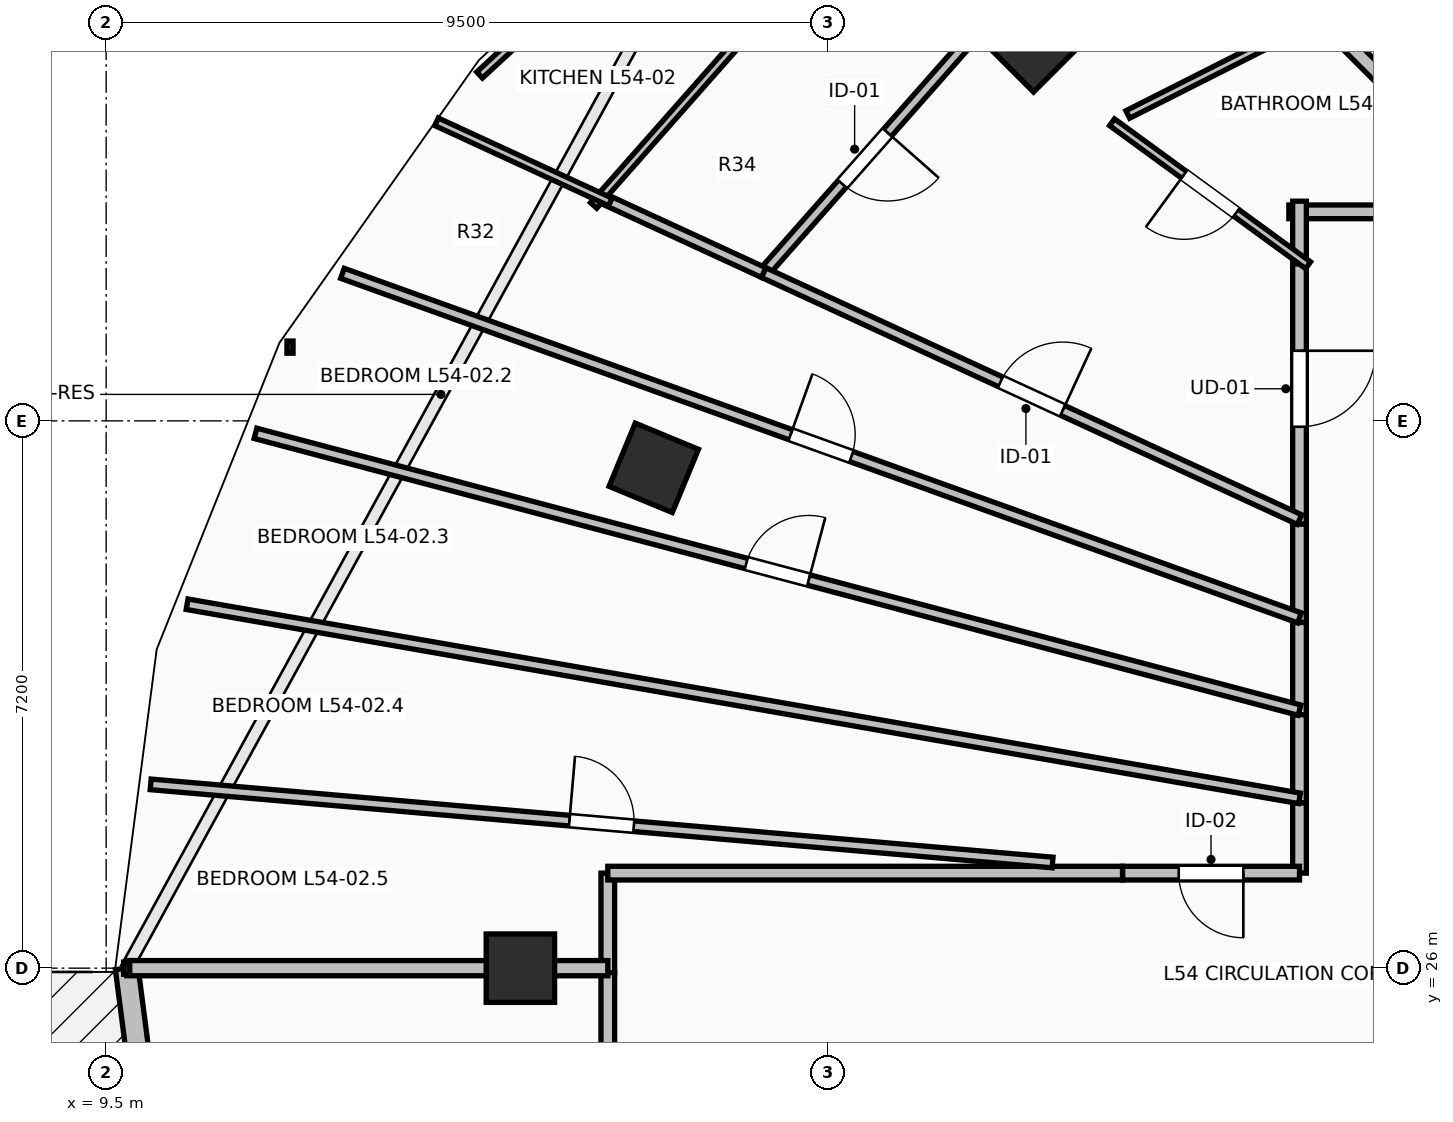
"""IFC4 building model, lengths in metres.
Left out: names, types, materials, properties, quantities, classifications, styles, units other than length and angle.
Written with IfcOpenShell. Run it as: python <this file> out.ifc"""

import sys

from ifc_helpers import new_model, si_unit, direction, frame, frame_2d, origin, origin_2d, place, context, subcontext, project, spatial, rectangle, extrude, element, fill, save


model = new_model("IFC4")
c1 = context("Model", 3, precision=1e-05, world=origin(), true_north=direction((0.0, 1.0)))
c2 = subcontext(c1, "Body", "Model", "MODEL_VIEW")
j1 = project(units=[si_unit("LENGTHUNIT", "METRE"), si_unit("PLANEANGLEUNIT", "RADIAN")], contexts=[c1])
p1 = place(None, origin())
s1 = spatial("IfcSite", under=j1, at=p1, CompositionType="ELEMENT")
p2 = place(p1, origin())
s2 = spatial("IfcBuilding", under=s1, at=p2, CompositionType="ELEMENT")
p3 = place(p2, frame((0.0, 0.0, 200.1)))
s3 = spatial("IfcBuildingStorey", under=s2, at=p3, CompositionType="ELEMENT", Elevation=200.1)
for number, where, z_axis, x_axis in (
    (1, (21.701, 38.162, 0.0), (0.0, 0.0, 1.0), (-0.707, 0.707, 0.0)),
    (2, (16.705, 32.582, 0.0), (0.0, 0.0, 1.0), (-0.924, 0.383, 0.0)),
    (3, (14.95, 26.0, 0.0), (0.0, 0.0, 1.0), (-1.0, 0.0, 0.0)),
):
    element("IfcColumn", number, at=place(p3, frame(where, z_axis=z_axis, x_axis=x_axis)), inside=s3, PredefinedType="COLUMN", context=c2, shape_type="SweptSolid", body=[
        extrude(rectangle(XDim=0.9, YDim=0.9, at=origin_2d()), origin(), (0.0, 0.0, 1.0), 3.55),
    ])
p4 = place(p3, frame((9.77, 26.0, 0.0), z_axis=(0.0, 0.0, 1.0), x_axis=(0.129147853268, -0.991625348605, 0.0)))
e4 = element("IfcWall", 4, at=p4, inside=s3, PredefinedType="STANDARD", context=c2, shape_type="SweptSolid", body=[
    extrude(rectangle(XDim=4.2, YDim=0.3, at=frame_2d((2.1, 0.0))), origin(), (0.0, 0.0, 1.0), 3.29),
])
p5 = place(p4, frame((1.3, 0.0, 0.0)))
e5 = element("IfcOpeningElement", 5, at=p5, cuts=e4, PredefinedType="OPENING", context=c2, shape_type="SweptSolid", body=[
    extrude(rectangle(XDim=1.6, YDim=2.3, at=frame_2d((0.8, 1.15))), frame((0.0, 0.165, 0.0), z_axis=(0.0, -1.0, 0.0), x_axis=(1.0, 0.0, 0.0)), (0.0, 0.0, 1.0), 0.33),
])
p6 = place(p3, frame((25.2, 35.404, 0.0), z_axis=(0.0, 0.0, 1.0), x_axis=(0.0, -1.0, 0.0)))
e6 = element("IfcWall", 6, at=p6, inside=s3, PredefinedType="PARTITIONING", context=c2, shape_type="SweptSolid", body=[
    extrude(rectangle(XDim=3.563, YDim=0.18, at=frame_2d((1.781, 0.0))), origin(), (0.0, 0.0, 1.0), 2.482),
])
p7 = place(p6, frame((1.281, 0.0, 0.0)))
e7 = element("IfcOpeningElement", 7, at=p7, cuts=e6, PredefinedType="OPENING", context=c2, shape_type="SweptSolid", body=[
    extrude(rectangle(XDim=1.0, YDim=2.15, at=frame_2d((0.5, 1.075))), frame((0.0, 0.105, 0.0), z_axis=(0.0, -1.0, 0.0), x_axis=(1.0, 0.0, 0.0)), (0.0, 0.0, 1.0), 0.21),
])
p8 = place(p3, frame((28.105, 35.95, 0.0), z_axis=(0.0, 0.0, 1.0), x_axis=(-1.0, 0.0, 0.0)))
e8 = element("IfcWall", 8, at=p8, inside=s3, PredefinedType="PARTITIONING", context=c2, shape_type="SweptSolid", body=[
    extrude(rectangle(XDim=3.045, YDim=0.18, at=frame_2d((1.522, 0.0))), origin(), (0.0, 0.0, 1.0), 2.482),
])
p9 = place(p3, frame((25.2, 36.09, 0.0), z_axis=(0.0, 0.0, 1.0), x_axis=(0.0, -1.0, 0.0)))
e9 = element("IfcWall", 9, at=p9, inside=s3, PredefinedType="PARTITIONING", context=c2, shape_type="SweptSolid", body=[
    extrude(rectangle(XDim=0.826, YDim=0.18, at=frame_2d((0.413, 0.0))), origin(), (0.0, 0.0, 1.0), 2.482),
])
p10 = place(p3, frame((25.2, 31.841, 0.0), z_axis=(0.0, 0.0, 1.0), x_axis=(0.0, -1.0, 0.0)))
e10 = element("IfcWall", 10, at=p10, inside=s3, PredefinedType="PARTITIONING", context=c2, shape_type="SweptSolid", body=[
    extrude(rectangle(XDim=1.293, YDim=0.18, at=frame_2d((0.646, 0.0))), origin(), (0.0, 0.0, 1.0), 3.29),
])
p11 = place(p3, frame((25.2, 30.548, 0.0), z_axis=(0.0, 0.0, 1.0), x_axis=(0.0, -1.0, 0.0)))
e11 = element("IfcWall", 11, at=p11, inside=s3, PredefinedType="PARTITIONING", context=c2, shape_type="SweptSolid", body=[
    extrude(rectangle(XDim=1.214, YDim=0.18, at=frame_2d((0.607, 0.0))), origin(), (0.0, 0.0, 1.0), 2.482),
])
p12 = place(p3, frame((25.2, 29.334, 0.0), z_axis=(0.0, 0.0, 1.0), x_axis=(0.0, -1.0, 0.0)))
e12 = element("IfcWall", 12, at=p12, inside=s3, PredefinedType="PARTITIONING", context=c2, shape_type="SweptSolid", body=[
    extrude(rectangle(XDim=1.16, YDim=0.18, at=frame_2d((0.58, 0.0))), origin(), (0.0, 0.0, 1.0), 2.482),
])
p13 = place(p3, frame((25.2, 28.174, 0.0), z_axis=(0.0, 0.0, 1.0), x_axis=(0.0, -1.0, 0.0)))
e13 = element("IfcWall", 13, at=p13, inside=s3, PredefinedType="PARTITIONING", context=c2, shape_type="SweptSolid", body=[
    extrude(rectangle(XDim=0.924, YDim=0.18, at=frame_2d((0.462, 0.0))), origin(), (0.0, 0.0, 1.0), 2.482),
])
p14 = place(p3, frame((25.2, 27.25, 0.0), z_axis=(0.0, 0.0, 1.0), x_axis=(-1.0, 0.0, 0.0)))
e14 = element("IfcWall", 14, at=p14, inside=s3, PredefinedType="PARTITIONING", context=c2, shape_type="SweptSolid", body=[
    extrude(rectangle(XDim=2.328, YDim=0.18, at=frame_2d((1.164, 0.0))), origin(), (0.0, 0.0, 1.0), 2.482),
])
p15 = place(p14, frame((0.739, 0.0, 0.0)))
e15 = element("IfcOpeningElement", 15, at=p15, cuts=e14, PredefinedType="OPENING", context=c2, shape_type="SweptSolid", body=[
    extrude(rectangle(XDim=0.85, YDim=2.1, at=frame_2d((0.425, 1.05))), frame((0.0, 0.105, 0.0), z_axis=(0.0, -1.0, 0.0), x_axis=(1.0, 0.0, 0.0)), (0.0, 0.0, 1.0), 0.21),
])
p16 = place(p3, frame((16.1, 27.25, 0.0), z_axis=(0.0, 0.0, 1.0), x_axis=(0.0, -1.0, 0.0)))
e16 = element("IfcWall", 16, at=p16, inside=s3, PredefinedType="PARTITIONING", context=c2, shape_type="SweptSolid", body=[
    extrude(rectangle(XDim=1.31, YDim=0.18, at=frame_2d((0.655, 0.0))), origin(), (0.0, 0.0, 1.0), 2.482),
])
p17 = place(p3, frame((22.872, 27.25, 0.0), z_axis=(0.0, 0.0, 1.0), x_axis=(-1.0, 0.0, 0.0)))
e17 = element("IfcWall", 17, at=p17, inside=s3, PredefinedType="PARTITIONING", context=c2, shape_type="SweptSolid", body=[
    extrude(rectangle(XDim=6.772, YDim=0.18, at=frame_2d((3.386, 0.0))), origin(), (0.0, 0.0, 1.0), 2.482),
])
p18 = place(p3, frame((16.1, 25.94, 0.0), z_axis=(0.0, 0.0, 1.0), x_axis=(0.0, -1.0, 0.0)))
e18 = element("IfcWall", 18, at=p18, inside=s3, PredefinedType="PARTITIONING", context=c2, shape_type="SweptSolid", body=[
    extrude(rectangle(XDim=1.39, YDim=0.18, at=frame_2d((0.695, 0.0))), origin(), (0.0, 0.0, 1.0), 2.482),
])
p19 = place(p3, frame((25.749, 45.138, 0.0), z_axis=(0.0, 0.0, 1.0), x_axis=(0.539168632786, -0.842197830335, 0.0)))
e19 = element("IfcWall", 19, at=p19, inside=s3, PredefinedType="PARTITIONING", context=c2, shape_type="SweptSolid", body=[
    extrude(rectangle(XDim=10.909, YDim=0.14, at=frame_2d((5.455, 0.0))), origin(), (0.0, 0.0, 1.0), 2.482),
])
p20 = place(p3, frame((23.378, 44.178, 0.0), z_axis=(0.0, 0.0, 1.0), x_axis=(0.626756813732, -0.779214923137, 0.0)))
e20 = element("IfcWall", 20, at=p20, inside=s3, PredefinedType="PARTITIONING", context=c2, shape_type="SweptSolid", body=[
    extrude(rectangle(XDim=10.559, YDim=0.14, at=frame_2d((5.28, 0.0))), origin(), (0.0, 0.0, 1.0), 2.482),
])
p21 = place(p3, frame((21.041, 42.959, 0.0), z_axis=(0.0, 0.0, 1.0), x_axis=(0.707106781187, -0.707106781187, 0.0)))
e21 = element("IfcWall", 21, at=p21, inside=s3, PredefinedType="PARTITIONING", context=c2, shape_type="SweptSolid", body=[
    extrude(rectangle(XDim=9.912, YDim=0.2, at=frame_2d((4.956, 0.0))), origin(), (0.0, 0.0, 1.0), 2.482),
])
p22 = place(p3, frame((25.313, 35.248, 0.0), z_axis=(0.0, 0.0, 1.0), x_axis=(-0.807968083988, 0.58922625133, 0.0)))
e22 = element("IfcWall", 22, at=p22, inside=s3, PredefinedType="PARTITIONING", context=c2, shape_type="SweptSolid", body=[
    extrude(rectangle(XDim=3.192, YDim=0.11, at=frame_2d((1.596, 0.0))), origin(), (0.0, 0.0, 1.0), 2.482),
])
p23 = place(p22, frame((1.171, 0.0, 0.0)))
e23 = element("IfcOpeningElement", 23, at=p23, cuts=e22, PredefinedType="OPENING", context=c2, shape_type="SweptSolid", body=[
    extrude(rectangle(XDim=0.85, YDim=2.1, at=frame_2d((0.425, 1.05))), frame((0.0, 0.07, 0.0), z_axis=(0.0, -1.0, 0.0), x_axis=(1.0, 0.0, 0.0)), (0.0, 0.0, 1.0), 0.14),
])
p24 = place(p3, frame((22.941, 37.231, 0.0), z_axis=(0.0, 0.0, 1.0), x_axis=(0.892507731149, 0.451032094024, 0.0)))
e24 = element("IfcWall", 24, at=p24, inside=s3, PredefinedType="PARTITIONING", context=c2, shape_type="SweptSolid", body=[
    extrude(rectangle(XDim=2.989, YDim=0.11, at=frame_2d((1.495, 0.0))), origin(), (0.0, 0.0, 1.0), 2.482),
])
p25 = place(p3, frame((17.59, 40.682, 0.0), z_axis=(0.0, 0.0, 1.0), x_axis=(-0.734861902375, -0.678216768031, 0.0)))
e25 = element("IfcWall", 25, at=p25, inside=s3, PredefinedType="PARTITIONING", context=c2, shape_type="SweptSolid", body=[
    extrude(rectangle(XDim=4.323, YDim=0.11, at=frame_2d((2.162, 0.0))), origin(), (0.0, 0.0, 1.0), 3.29),
])
p26 = place(p3, frame((20.812, 38.161, 0.0), z_axis=(0.0, 0.0, 1.0), x_axis=(-0.662063683649, -0.749447582418, 0.0)))
e26 = element("IfcWall", 26, at=p26, inside=s3, PredefinedType="PARTITIONING", context=c2, shape_type="SweptSolid", body=[
    extrude(rectangle(XDim=4.018, YDim=0.14, at=frame_2d((2.009, 0.0))), origin(), (0.0, 0.0, 1.0), 3.29),
])
p27 = place(p26, frame((1.559, 0.0, 0.0)))
e27 = element("IfcOpeningElement", 27, at=p27, cuts=e26, PredefinedType="OPENING", context=c2, shape_type="SweptSolid", body=[
    extrude(rectangle(XDim=0.9, YDim=2.1, at=frame_2d((0.45, 1.05))), frame((0.0, 0.085, 0.0), z_axis=(0.0, -1.0, 0.0), x_axis=(1.0, 0.0, 0.0)), (0.0, 0.0, 1.0), 0.17),
])
p28 = place(p3, frame((18.152, 35.15, 0.0), z_axis=(0.0, 0.0, 1.0), x_axis=(-0.908192094718, 0.418553603607, 0.0)))
e28 = element("IfcWall", 28, at=p28, inside=s3, PredefinedType="PARTITIONING", context=c2, shape_type="SweptSolid", body=[
    extrude(rectangle(XDim=2.363, YDim=0.14, at=frame_2d((1.182, 0.0))), origin(), (0.0, 0.0, 1.0), 3.29),
])
p29 = place(p3, frame((18.152, 35.15, 0.0), z_axis=(0.0, 0.0, 1.0), x_axis=(0.908152637685, -0.418639208227, 0.0)))
e29 = element("IfcWall", 29, at=p29, inside=s3, PredefinedType="PARTITIONING", context=c2, shape_type="SweptSolid", body=[
    extrude(rectangle(XDim=7.761, YDim=0.14, at=frame_2d((3.88, 0.0))), origin(), (0.0, 0.0, 1.0), 2.824),
])
p30 = place(p29, frame((3.43, 0.0, 0.0)))
e30 = element("IfcOpeningElement", 30, at=p30, cuts=e29, PredefinedType="OPENING", context=c2, shape_type="SweptSolid", body=[
    extrude(rectangle(XDim=0.9, YDim=2.1, at=frame_2d((0.45, 1.05))), frame((0.0, 0.085, 0.0), z_axis=(0.0, -1.0, 0.0), x_axis=(1.0, 0.0, 0.0)), (0.0, 0.0, 1.0), 0.17),
])
p31 = place(p3, frame((15.913, 36.034, 0.0), z_axis=(0.0, 0.0, 1.0), x_axis=(0.662189711464, 0.749336230294, 0.0)))
e31 = element("IfcWall", 31, at=p31, inside=s3, PredefinedType="PARTITIONING", context=c2, shape_type="SweptSolid", body=[
    extrude(rectangle(XDim=4.732, YDim=0.11, at=frame_2d((2.366, 0.0))), origin(), (0.0, 0.0, 1.0), 3.29),
])
p32 = place(p3, frame((13.847, 37.135, 0.0), z_axis=(0.0, 0.0, 1.0), x_axis=(0.908101251341, -0.418750662462, 0.0)))
e32 = element("IfcWall", 32, at=p32, inside=s3, PredefinedType="PARTITIONING", context=c2, shape_type="SweptSolid", body=[
    extrude(rectangle(XDim=2.518, YDim=0.11, at=frame_2d((1.259, 0.0))), origin(), (0.0, 0.0, 1.0), 3.29),
])
p33 = place(p3, frame((12.609, 35.141, 0.0), z_axis=(0.0, 0.0, 1.0), x_axis=(0.940877411069, -0.338747246985, 0.0)))
e33 = element("IfcWall", 33, at=p33, inside=s3, PredefinedType="PARTITIONING", context=c2, shape_type="SweptSolid", body=[
    extrude(rectangle(XDim=13.382, YDim=0.14, at=frame_2d((6.691, 0.0))), origin(), (0.0, 0.0, 1.0), 2.824),
])
p34 = place(p33, frame((6.266, 0.0, 0.0)))
e34 = element("IfcOpeningElement", 34, at=p34, cuts=e33, PredefinedType="OPENING", context=c2, shape_type="SweptSolid", body=[
    extrude(rectangle(XDim=0.85, YDim=2.1, at=frame_2d((0.425, 1.05))), frame((0.0, 0.085, 0.0), z_axis=(0.0, -1.0, 0.0), x_axis=(1.0, 0.0, 0.0)), (0.0, 0.0, 1.0), 0.17),
])
p35 = place(p3, frame((11.465, 33.036, 0.0), z_axis=(0.0, 0.0, 1.0), x_axis=(0.966598137313, -0.256296782934, 0.0)))
e35 = element("IfcWall", 35, at=p35, inside=s3, PredefinedType="PARTITIONING", context=c2, shape_type="SweptSolid", body=[
    extrude(rectangle(XDim=14.209, YDim=0.14, at=frame_2d((7.105, 0.0))), origin(), (0.0, 0.0, 1.0), 2.482),
])
p36 = place(p35, frame((6.68, 0.0, 0.0)))
e36 = element("IfcOpeningElement", 36, at=p36, cuts=e35, PredefinedType="OPENING", context=c2, shape_type="SweptSolid", body=[
    extrude(rectangle(XDim=0.85, YDim=2.1, at=frame_2d((0.425, 1.05))), frame((0.0, 0.085, 0.0), z_axis=(0.0, -1.0, 0.0), x_axis=(1.0, 0.0, 0.0)), (0.0, 0.0, 1.0), 0.17),
])
p37 = place(p3, frame((10.565, 30.788, 0.0), z_axis=(0.0, 0.0, 1.0), x_axis=(0.985109541297, -0.171927867563, 0.0)))
e37 = element("IfcWall", 37, at=p37, inside=s3, PredefinedType="PARTITIONING", context=c2, shape_type="SweptSolid", body=[
    extrude(rectangle(XDim=14.856, YDim=0.14, at=frame_2d((7.428, 0.0))), origin(), (0.0, 0.0, 1.0), 2.824),
])
p38 = place(p3, frame((10.086, 28.418, 0.0), z_axis=(0.0, 0.0, 1.0), x_axis=(0.996267232338, -0.08632266081, 0.0)))
e38 = element("IfcWall", 38, at=p38, inside=s3, PredefinedType="PARTITIONING", context=c2, shape_type="SweptSolid", body=[
    extrude(rectangle(XDim=11.91, YDim=0.14, at=frame_2d((5.955, 0.0))), origin(), (0.0, 0.0, 1.0), 2.482),
])
p39 = place(p38, frame((5.53, 0.0, 0.0)))
e39 = element("IfcOpeningElement", 39, at=p39, cuts=e38, PredefinedType="OPENING", context=c2, shape_type="SweptSolid", body=[
    extrude(rectangle(XDim=0.85, YDim=2.1, at=frame_2d((0.425, 1.05))), frame((0.0, 0.085, 0.0), z_axis=(0.0, -1.0, 0.0), x_axis=(1.0, 0.0, 0.0)), (0.0, 0.0, 1.0), 0.17),
])
p40 = place(p3, frame((9.771, 26.0, 0.0), z_axis=(0.0, 0.0, 1.0), x_axis=(1.0, 0.0, 0.0)))
e40 = element("IfcWall", 40, at=p40, inside=s3, PredefinedType="PARTITIONING", context=c2, shape_type="SweptSolid", body=[
    extrude(rectangle(XDim=6.329, YDim=0.2, at=frame_2d((3.165, 0.0))), origin(), (0.0, 0.0, 1.0), 2.482),
])
p41 = place(p7, origin())
e41 = element("IfcDoor", 41, at=p41, inside=s3, OperationType="SINGLE_SWING_LEFT", PredefinedType="DOOR", context=c2, shape_type="SweptSolid", body=[
    extrude(rectangle(XDim=1.0, YDim=2.15, at=frame_2d((0.5, 1.075))), frame((0.0, 0.025, 0.0), z_axis=(0.0, -1.0, 0.0), x_axis=(1.0, 0.0, 0.0)), (0.0, 0.0, 1.0), 0.05),
])
fill(e7, e41)
p42 = place(p23, origin())
e42 = element("IfcDoor", 42, at=p42, inside=s3, OperationType="SINGLE_SWING_RIGHT", PredefinedType="DOOR", context=c2, shape_type="SweptSolid", body=[
    extrude(rectangle(XDim=0.85, YDim=2.1, at=frame_2d((0.425, 1.05))), frame((0.0, 0.025, 0.0), z_axis=(0.0, -1.0, 0.0), x_axis=(1.0, 0.0, 0.0)), (0.0, 0.0, 1.0), 0.05),
])
fill(e23, e42)
p43 = place(p27, origin())
e43 = element("IfcDoor", 43, at=p43, inside=s3, OperationType="SINGLE_SWING_LEFT", PredefinedType="DOOR", context=c2, shape_type="SweptSolid", body=[
    extrude(rectangle(XDim=0.9, YDim=2.1, at=frame_2d((0.45, 1.05))), frame((0.0, 0.025, 0.0), z_axis=(0.0, -1.0, 0.0), x_axis=(1.0, 0.0, 0.0)), (0.0, 0.0, 1.0), 0.05),
])
fill(e27, e43)
p44 = place(p30, origin())
e44 = element("IfcDoor", 44, at=p44, inside=s3, OperationType="SINGLE_SWING_RIGHT", PredefinedType="DOOR", context=c2, shape_type="SweptSolid", body=[
    extrude(rectangle(XDim=0.9, YDim=2.1, at=frame_2d((0.45, 1.05))), frame((0.0, 0.025, 0.0), z_axis=(0.0, -1.0, 0.0), x_axis=(1.0, 0.0, 0.0)), (0.0, 0.0, 1.0), 0.05),
])
fill(e30, e44)
p45 = place(p15, origin())
e45 = element("IfcDoor", 45, at=p45, inside=s3, OperationType="SINGLE_SWING_LEFT", PredefinedType="DOOR", context=c2, shape_type="SweptSolid", body=[
    extrude(rectangle(XDim=0.85, YDim=2.1, at=frame_2d((0.425, 1.05))), frame((0.0, 0.025, 0.0), z_axis=(0.0, -1.0, 0.0), x_axis=(1.0, 0.0, 0.0)), (0.0, 0.0, 1.0), 0.05),
])
fill(e15, e45)
p46 = place(p34, origin())
e46 = element("IfcDoor", 46, at=p46, inside=s3, OperationType="SINGLE_SWING_LEFT", PredefinedType="DOOR", context=c2, shape_type="SweptSolid", body=[
    extrude(rectangle(XDim=0.85, YDim=2.1, at=frame_2d((0.425, 1.05))), frame((0.0, 0.025, 0.0), z_axis=(0.0, -1.0, 0.0), x_axis=(1.0, 0.0, 0.0)), (0.0, 0.0, 1.0), 0.05),
])
fill(e34, e46)
p47 = place(p36, origin())
e47 = element("IfcDoor", 47, at=p47, inside=s3, OperationType="SINGLE_SWING_RIGHT", PredefinedType="DOOR", context=c2, shape_type="SweptSolid", body=[
    extrude(rectangle(XDim=0.85, YDim=2.1, at=frame_2d((0.425, 1.05))), frame((0.0, 0.025, 0.0), z_axis=(0.0, -1.0, 0.0), x_axis=(1.0, 0.0, 0.0)), (0.0, 0.0, 1.0), 0.05),
])
fill(e36, e47)
p48 = place(p39, origin())
e48 = element("IfcDoor", 48, at=p48, inside=s3, OperationType="SINGLE_SWING_LEFT", PredefinedType="DOOR", context=c2, shape_type="SweptSolid", body=[
    extrude(rectangle(XDim=0.85, YDim=2.1, at=frame_2d((0.425, 1.05))), frame((0.0, 0.025, 0.0), z_axis=(0.0, -1.0, 0.0), x_axis=(1.0, 0.0, 0.0)), (0.0, 0.0, 1.0), 0.05),
])
fill(e39, e48)
save(model, sys.argv[1])
